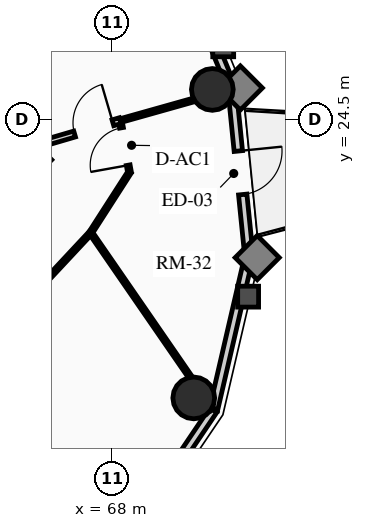
"""IFC4 building model, lengths in metres.
Left out: names, types, materials, properties, quantities, classifications, styles, units other than length and angle.
Written with IfcOpenShell. Run it as: python <this file> out.ifc"""

import sys

from ifc_helpers import new_model, si_unit, direction, frame, frame_2d, origin, origin_2d, place, context, subcontext, project, spatial, rectangle, circle, extrude, source, transform, mapped, element, fill, save


model = new_model("IFC4")
c1 = context("Model", 3, precision=1e-05, world=origin(), true_north=direction((0.0, 1.0)))
c2 = subcontext(c1, "Body", "Model", "MODEL_VIEW")
j1 = project(units=[si_unit("LENGTHUNIT", "METRE"), si_unit("PLANEANGLEUNIT", "RADIAN")], contexts=[c1])
p1 = place(None, origin())
s1 = spatial("IfcSite", under=j1, at=p1, CompositionType="ELEMENT")
p2 = place(p1, origin())
s2 = spatial("IfcBuilding", under=s1, at=p2, CompositionType="ELEMENT")
p3 = place(p2, frame((0.0, 0.0, 232.45)))
s3 = spatial("IfcBuildingStorey", under=s2, at=p3, CompositionType="ELEMENT", Elevation=232.45)
for number, where, z_axis, x_axis in (
    (1, (70.146, 17.173, 0.0), (0.0, 0.0, 1.0), (1.0, 0.0, 0.0)),
    (2, (70.635, 25.291, 0.0), (0.0, 0.0, 1.0), (1.0, 0.0, 0.0)),
):
    element("IfcColumn", number, at=place(p3, frame(where, z_axis=z_axis, x_axis=x_axis)), inside=s3, PredefinedType="USERDEFINED", context=c2, shape_type="SweptSolid", body=[
        extrude(circle(Radius=0.55, at=origin_2d()), origin(), (0.0, 0.0, 1.0), 3.2),
    ])
p4 = place(p3, frame((70.663, 16.856, 0.0), z_axis=(0.0, 0.0, 1.0), x_axis=(-0.559495003079, -0.828833723692, 0.0)))
e3 = element("IfcWall", 3, at=p4, inside=s3, PredefinedType="SOLIDWALL", context=c2, shape_type="SweptSolid", body=[
    extrude(rectangle(XDim=3.976, YDim=0.22, at=frame_2d((1.988, 0.0))), origin(), (0.0, 0.0, 1.0), 2.402),
])
m1 = source(origin(), c2, "Body", "SweptSolid", [
    extrude(rectangle(XDim=1.05, YDim=1.3, at=frame_2d((0.525, 0.65))), frame((0.0, 0.12, 0.0), z_axis=(0.0, -1.0, 0.0), x_axis=(1.0, 0.0, 0.0)), (0.0, 0.0, 1.0), 0.24),
])
p5 = place(p4, frame((1.463, 0.0, 0.65)))
e4 = element("IfcOpeningElement", 4, at=p5, cuts=e3, PredefinedType="OPENING", context=c2, shape_type="MappedRepresentation", body=[
    mapped(m1, transform((0.0, 0.0, 0.0), x_axis=(1.0, 0.0, 0.0), y_axis=(0.0, 1.0, 0.0), z_axis=(0.0, 0.0, 1.0), scale=1.0)),
])
p6 = place(p3, frame((71.599, 20.9, 0.0), z_axis=(0.0, 0.0, 1.0), x_axis=(-0.225473813158, -0.974249228678, 0.0)))
e5 = element("IfcWall", 5, at=p6, inside=s3, PredefinedType="SOLIDWALL", context=c2, shape_type="SweptSolid", body=[
    extrude(rectangle(XDim=4.15, YDim=0.22, at=frame_2d((2.075, 0.0))), origin(), (0.0, 0.0, 1.0), 2.402),
])
p7 = place(p3, frame((71.155, 25.295, 0.0), z_axis=(0.0, 0.0, 1.0), x_axis=(0.100570534541, -0.994929930991, 0.0)))
e6 = element("IfcWall", 6, at=p7, inside=s3, PredefinedType="SOLIDWALL", context=c2, shape_type="SweptSolid", body=[
    extrude(rectangle(XDim=4.418, YDim=0.22, at=frame_2d((2.209, 0.0))), origin(), (0.0, 0.0, 1.0), 2.402),
])
m2 = source(origin(), c2, "Body", "SweptSolid", [
    extrude(rectangle(XDim=1.15, YDim=2.005, at=frame_2d((0.575, 1.002))), frame((0.0, 0.12, 0.0), z_axis=(0.0, -1.0, 0.0), x_axis=(1.0, 0.0, 0.0)), (0.0, 0.0, 1.0), 0.24),
])
p8 = place(p7, frame((1.634, 0.0, 0.0)))
e7 = element("IfcOpeningElement", 7, at=p8, cuts=e6, PredefinedType="OPENING", context=c2, shape_type="MappedRepresentation", body=[
    mapped(m2, transform((0.0, 0.0, 0.0), x_axis=(1.0, 0.0, 0.0), y_axis=(0.0, 1.0, 0.0), z_axis=(0.0, 0.0, 1.0), scale=1.0)),
])
p9 = place(p3, frame((69.374, 29.613, 0.0), z_axis=(0.0, 0.0, 1.0), x_axis=(0.381309704956, -0.924447353237, 0.0)))
e8 = element("IfcWall", 8, at=p9, inside=s3, PredefinedType="SOLIDWALL", context=c2, shape_type="SweptSolid", body=[
    extrude(rectangle(XDim=4.671, YDim=0.22, at=frame_2d((2.335, 0.0))), origin(), (0.0, 0.0, 1.0), 2.402),
])
p10 = place(p3, frame((62.903, 16.667, 0.0), z_axis=(0.0, 0.0, 1.0), x_axis=(0.682371947497, 0.731005147225, 0.0)))
e9 = element("IfcWall", 9, at=p10, inside=s3, PredefinedType="MOVABLE", context=c2, shape_type="SweptSolid", body=[
    extrude(rectangle(XDim=6.642, YDim=0.1, at=frame_2d((3.321, 0.0))), origin(), (0.0, 0.0, 1.0), 2.335),
])
m3 = source(origin(), c2, "Body", "SweptSolid", [
    extrude(rectangle(XDim=1.05, YDim=2.015, at=frame_2d((0.525, 1.007))), frame((0.0, 0.06, 0.0), z_axis=(0.0, -1.0, 0.0), x_axis=(1.0, 0.0, 0.0)), (0.0, 0.0, 1.0), 0.12),
])
p11 = place(p10, frame((2.796, 0.0, 0.0)))
e10 = element("IfcOpeningElement", 10, at=p11, cuts=e9, PredefinedType="OPENING", context=c2, shape_type="MappedRepresentation", body=[
    mapped(m3, transform((0.0, 0.0, 0.0), x_axis=(1.0, 0.0, 0.0), y_axis=(0.0, 1.0, 0.0), z_axis=(0.0, 0.0, 1.0), scale=1.0)),
])
p12 = place(p3, frame((67.435, 21.521, 0.0), z_axis=(0.0, 0.0, 1.0), x_axis=(0.540777197838, 0.841165870859, 0.0)))
e11 = element("IfcWall", 11, at=p12, inside=s3, PredefinedType="MOVABLE", context=c2, shape_type="SweptSolid", body=[
    extrude(rectangle(XDim=1.888, YDim=0.1, at=frame_2d((0.944, 0.0))), origin(), (0.0, 0.0, 1.0), 2.335),
])
p13 = place(p3, frame((68.456, 23.11, 0.0), z_axis=(0.0, 0.0, 1.0), x_axis=(-0.1772522795, 0.984165448191, 0.0)))
e12 = element("IfcWall", 12, at=p13, inside=s3, PredefinedType="MOVABLE", context=c2, shape_type="SweptSolid", body=[
    extrude(rectangle(XDim=1.382, YDim=0.1, at=frame_2d((0.691, 0.0))), origin(), (0.0, 0.0, 1.0), 2.402),
])
m4 = source(origin(), c2, "Body", "SweptSolid", [
    extrude(rectangle(XDim=1.0, YDim=2.015, at=frame_2d((0.5, 1.007))), frame((0.0, 0.06, 0.0), z_axis=(0.0, -1.0, 0.0), x_axis=(1.0, 0.0, 0.0)), (0.0, 0.0, 1.0), 0.12),
])
p14 = place(p13, frame((0.191, 0.0, 0.0)))
e13 = element("IfcOpeningElement", 13, at=p14, cuts=e12, PredefinedType="OPENING", context=c2, shape_type="MappedRepresentation", body=[
    mapped(m4, transform((0.0, 0.0, 0.0), x_axis=(1.0, 0.0, 0.0), y_axis=(0.0, 1.0, 0.0), z_axis=(0.0, 0.0, 1.0), scale=1.0)),
])
p15 = place(p3, frame((67.435, 21.521, 0.0), z_axis=(0.0, 0.0, 1.0), x_axis=(0.567700677576, -0.823235045828, 0.0)))
e14 = element("IfcWall", 14, at=p15, inside=s3, PredefinedType="MOVABLE", context=c2, shape_type="SweptSolid", body=[
    extrude(rectangle(XDim=5.656, YDim=0.1, at=frame_2d((2.828, 0.0))), origin(), (0.0, 0.0, 1.0), 2.402),
])
p16 = place(p3, frame((68.211, 24.469, 0.0), z_axis=(0.0, 0.0, 1.0), x_axis=(0.962605107736, 0.270908483735, 0.0)))
e15 = element("IfcWall", 15, at=p16, inside=s3, PredefinedType="MOVABLE", context=c2, shape_type="SweptSolid", body=[
    extrude(rectangle(XDim=3.038, YDim=0.1, at=frame_2d((1.519, 0.0))), origin(), (0.0, 0.0, 1.0), 2.402),
])
p17 = place(p3, frame((66.021, 23.828, 0.0), z_axis=(0.0, 0.0, 1.0), x_axis=(0.959727558294, 0.280932400856, 0.0)))
e16 = element("IfcWall", 16, at=p17, inside=s3, PredefinedType="PARTITIONING", context=c2, shape_type="SweptSolid", body=[
    extrude(rectangle(XDim=2.282, YDim=0.16, at=frame_2d((1.141, 0.0))), origin(), (0.0, 0.0, 1.0), 2.335),
])
m5 = source(origin(), c2, "Body", "SweptSolid", [
    extrude(rectangle(XDim=1.05, YDim=2.015, at=frame_2d((0.525, 1.007))), frame((0.0, 0.09, 0.0), z_axis=(0.0, -1.0, 0.0), x_axis=(1.0, 0.0, 0.0)), (0.0, 0.0, 1.0), 0.18),
])
p18 = place(p17, frame((1.032, 0.0, 0.0)))
e17 = element("IfcOpeningElement", 17, at=p18, cuts=e16, PredefinedType="OPENING", context=c2, shape_type="MappedRepresentation", body=[
    mapped(m5, transform((0.0, 0.0, 0.0), x_axis=(1.0, 0.0, 0.0), y_axis=(0.0, 1.0, 0.0), z_axis=(0.0, 0.0, 1.0), scale=1.0)),
])
m6 = source(origin(), c2, "Body", "SweptSolid", [
    extrude(rectangle(XDim=1.15, YDim=2.005, at=frame_2d((0.575, 1.002))), frame((0.0, 0.025, 0.0), z_axis=(0.0, -1.0, 0.0), x_axis=(1.0, 0.0, 0.0)), (0.0, 0.0, 1.0), 0.05),
])
p19 = place(p8, origin())
e18 = element("IfcDoor", 18, at=p19, inside=s3, OperationType="SINGLE_SWING_LEFT", PredefinedType="DOOR", context=c2, shape_type="MappedRepresentation", body=[
    mapped(m6, transform((0.0, 0.0, 0.0), x_axis=(1.0, 0.0, 0.0), y_axis=(0.0, 1.0, 0.0), z_axis=(0.0, 0.0, 1.0), scale=1.0)),
])
fill(e7, e18)
m7 = source(origin(), c2, "Body", "SweptSolid", [
    extrude(rectangle(XDim=1.05, YDim=2.015, at=frame_2d((0.525, 1.007))), frame((0.0, 0.025, 0.0), z_axis=(0.0, -1.0, 0.0), x_axis=(1.0, 0.0, 0.0)), (0.0, 0.0, 1.0), 0.05),
])
p20 = place(p18, origin())
e19 = element("IfcDoor", 19, at=p20, inside=s3, OperationType="SINGLE_SWING_RIGHT", PredefinedType="DOOR", context=c2, shape_type="MappedRepresentation", body=[
    mapped(m7, transform((0.0, 0.0, 0.0), x_axis=(1.0, 0.0, 0.0), y_axis=(0.0, 1.0, 0.0), z_axis=(0.0, 0.0, 1.0), scale=1.0)),
])
fill(e17, e19)
m8 = source(origin(), c2, "Body", "SweptSolid", [
    extrude(rectangle(XDim=1.0, YDim=2.015, at=frame_2d((0.5, 1.007))), frame((0.0, 0.025, 0.0), z_axis=(0.0, -1.0, 0.0), x_axis=(1.0, 0.0, 0.0)), (0.0, 0.0, 1.0), 0.05),
])
p21 = place(p14, origin())
e20 = element("IfcDoor", 20, at=p21, inside=s3, OperationType="SINGLE_SWING_LEFT", PredefinedType="DOOR", context=c2, shape_type="MappedRepresentation", body=[
    mapped(m8, transform((0.0, 0.0, 0.0), x_axis=(1.0, 0.0, 0.0), y_axis=(0.0, 1.0, 0.0), z_axis=(0.0, 0.0, 1.0), scale=1.0)),
])
fill(e13, e20)
save(model, sys.argv[1])
